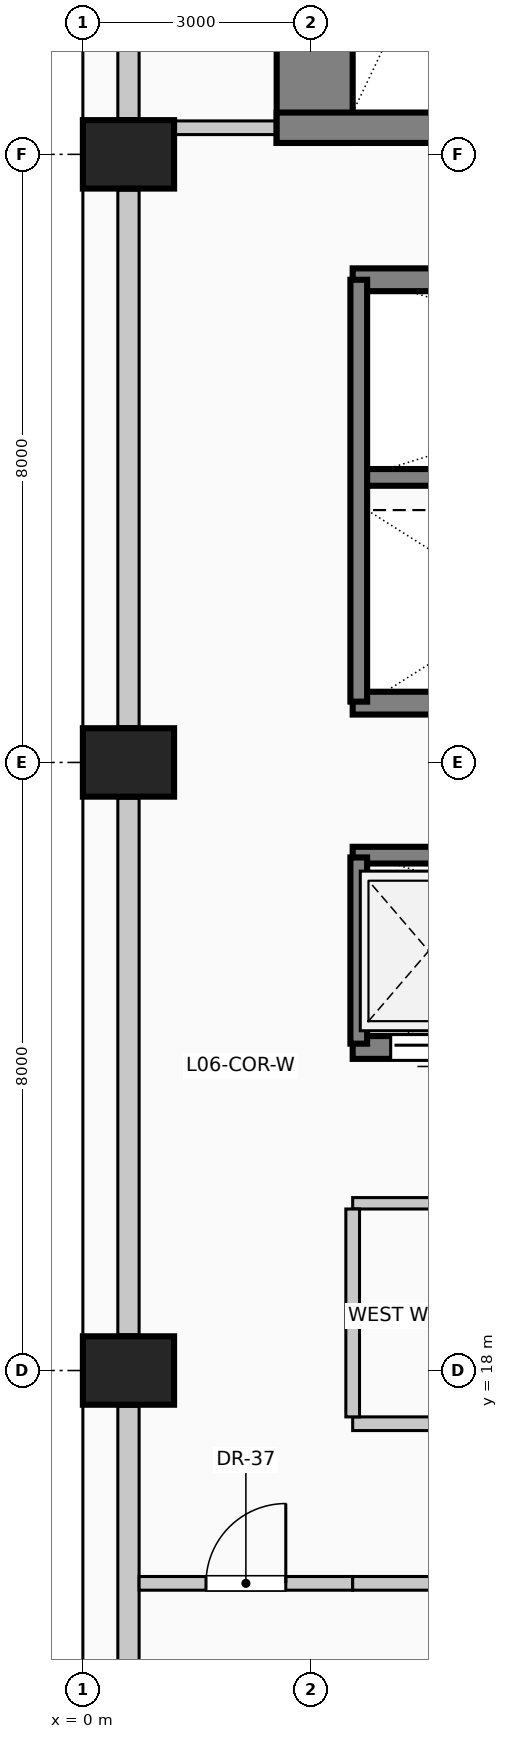
"""IFC4 building model, lengths in metres.
Left out: names, types, materials, properties, quantities, classifications, styles, units other than length and angle.
Written with IfcOpenShell. Run it as: python <this file> out.ifc"""

import sys

from ifc_helpers import new_model, si_unit, direction, frame, frame_2d, origin, origin_2d, place, context, subcontext, project, spatial, rectangle, extrude, element, fill, save


model = new_model("IFC4")
c1 = context("Model", 3, precision=1e-05, world=origin(), true_north=direction((0.0, 1.0)))
c2 = subcontext(c1, "Body", "Model", "MODEL_VIEW")
j1 = project(units=[si_unit("LENGTHUNIT", "METRE"), si_unit("PLANEANGLEUNIT", "RADIAN")], contexts=[c1])
p1 = place(None, origin())
s1 = spatial("IfcSite", under=j1, at=p1, CompositionType="ELEMENT")
p2 = place(p1, origin())
s2 = spatial("IfcBuilding", under=s1, at=p2, CompositionType="ELEMENT")
p3 = place(p2, frame((0.0, 0.0, 26.6)))
s3 = spatial("IfcBuildingStorey", under=s2, at=p3, CompositionType="ELEMENT", Elevation=26.6)
p4 = place(p3, frame((3.05, 34.15, 0.0), z_axis=(0.0, 0.0, 1.0), x_axis=(0.0, 1.0, 0.0)))
e1 = element("IfcWall", 1, at=p4, inside=s3, PredefinedType="SHEAR", context=c2, shape_type="SweptSolid", body=[
    extrude(rectangle(XDim=9.28, YDim=1.0, at=frame_2d((4.64, 0.0))), origin(), (0.0, 0.0, 1.0), 4.0),
])
p5 = place(p3, frame((2.55, 34.35, 0.0), z_axis=(0.0, 0.0, 1.0), x_axis=(1.0, 0.0, 0.0)))
e2 = element("IfcWall", 2, at=p5, inside=s3, PredefinedType="SHEAR", context=c2, shape_type="SweptSolid", body=[
    extrude(rectangle(XDim=5.16, YDim=0.4, at=frame_2d((2.58, 0.0))), origin(), (0.0, 0.0, 1.0), 4.0),
])
p6 = place(p5, frame((2.4, 0.0, 0.0)))
e3 = element("IfcOpeningElement", 3, at=p6, cuts=e2, PredefinedType="OPENING", context=c2, shape_type="SweptSolid", body=[
    extrude(rectangle(XDim=1.15, YDim=2.2, at=frame_2d((0.575, 1.1))), frame((0.0, 0.21, 0.0), z_axis=(0.0, -1.0, 0.0), x_axis=(1.0, 0.0, 0.0)), (0.0, 0.0, 1.0), 0.42),
])
for number, where, z_axis, x_axis in (
    (4, (0.6, 18.0, 0.0), (0.0, 0.0, 1.0), (0.0, 1.0, 0.0)),
    (5, (0.6, 26.0, 0.0), (0.0, 0.0, 1.0), (0.0, 1.0, 0.0)),
    (6, (0.6, 34.0, 0.0), (0.0, 0.0, 1.0), (0.0, 1.0, 0.0)),
):
    element("IfcColumn", number, at=place(p3, frame(where, z_axis=z_axis, x_axis=x_axis)), inside=s3, PredefinedType="COLUMN", context=c2, shape_type="SweptSolid", body=[
        extrude(rectangle(XDim=0.9, YDim=1.2, at=origin_2d()), origin(), (0.0, 0.0, 1.0), 4.0),
    ])
p7 = place(p3, frame((0.6, 10.47, 0.0), z_axis=(0.0, 0.0, 1.0), x_axis=(0.0, 1.0, 0.0)))
e7 = element("IfcWall", 7, at=p7, inside=s3, PredefinedType="SOLIDWALL", context=c2, shape_type="SweptSolid", body=[
    extrude(rectangle(XDim=7.06, YDim=0.28, at=frame_2d((3.53, 0.0))), origin(), (0.0, 0.0, 1.0), 2.85),
])
p8 = place(p7, frame((0.887, 0.0, 0.42)))
e8 = element("IfcOpeningElement", 8, at=p8, cuts=e7, PredefinedType="OPENING", context=c2, shape_type="SweptSolid", body=[
    extrude(rectangle(XDim=2.2, YDim=1.95, at=frame_2d((1.1, 0.975))), frame((0.0, 0.15, 0.0), z_axis=(0.0, -1.0, 0.0), x_axis=(1.0, 0.0, 0.0)), (0.0, 0.0, 1.0), 0.3),
])
for number, where, z_axis, x_axis in (
    (9, (0.6, 18.47, 0.0), (0.0, 0.0, 1.0), (0.0, 1.0, 0.0)),
    (10, (0.6, 26.47, 0.0), (0.0, 0.0, 1.0), (0.0, 1.0, 0.0)),
):
    element("IfcWall", number, at=place(p3, frame(where, z_axis=z_axis, x_axis=x_axis)), inside=s3, PredefinedType="SOLIDWALL", context=c2, shape_type="SweptSolid", body=[
        extrude(rectangle(XDim=7.06, YDim=0.28, at=frame_2d((3.53, 0.0))), origin(), (0.0, 0.0, 1.0), 2.85),
    ])
p9 = place(p3, frame((0.6, 34.47, 0.0), z_axis=(0.0, 0.0, 1.0), x_axis=(0.0, 1.0, 0.0)))
e11 = element("IfcWall", 11, at=p9, inside=s3, PredefinedType="SOLIDWALL", context=c2, shape_type="SweptSolid", body=[
    extrude(rectangle(XDim=7.46, YDim=0.28, at=frame_2d((3.73, 0.0))), origin(), (0.0, 0.0, 1.0), 2.85),
])
p10 = place(p3, frame((5.65, 22.25, 0.0), z_axis=(0.0, 0.0, 1.0), x_axis=(-1.0, 0.0, 0.0)))
e12 = element("IfcWall", 12, at=p10, inside=s3, PredefinedType="SOLIDWALL", context=c2, shape_type="SweptSolid", body=[
    extrude(rectangle(XDim=2.1, YDim=0.3, at=frame_2d((1.05, 0.0))), origin(), (0.0, 0.0, 1.0), 4.0),
])
p11 = place(p10, frame((0.5, 0.0, 0.0)))
e13 = element("IfcOpeningElement", 13, at=p11, cuts=e12, PredefinedType="OPENING", context=c2, shape_type="SweptSolid", body=[
    extrude(rectangle(XDim=1.1, YDim=2.2, at=frame_2d((0.55, 1.1))), frame((0.0, 0.16, 0.0), z_axis=(0.0, -1.0, 0.0), x_axis=(1.0, 0.0, 0.0)), (0.0, 0.0, 1.0), 0.32),
])
for number, where, z_axis, x_axis in (
    (14, (3.55, 32.35, 0.0), (0.0, 0.0, 1.0), (1.0, 0.0, 0.0)),
    (15, (5.65, 26.78, 0.0), (0.0, 0.0, 1.0), (-1.0, 0.0, 0.0)),
):
    element("IfcWall", number, at=place(p3, frame(where, z_axis=z_axis, x_axis=x_axis)), inside=s3, PredefinedType="SOLIDWALL", context=c2, shape_type="SweptSolid", body=[
        extrude(rectangle(XDim=2.1, YDim=0.3, at=frame_2d((1.05, 0.0))), origin(), (0.0, 0.0, 1.0), 4.0),
    ])
p12 = place(p3, frame((3.55, 29.75, 0.0), z_axis=(0.0, 0.0, 1.0), x_axis=(1.0, 0.0, 0.0)))
e16 = element("IfcWall", 16, at=p12, inside=s3, PredefinedType="SOLIDWALL", context=c2, shape_type="SweptSolid", body=[
    extrude(rectangle(XDim=8.65, YDim=0.22, at=frame_2d((4.325, 0.0))), origin(), (0.0, 0.0, 1.0), 4.0),
])
p13 = place(p3, frame((3.63, 26.8, 0.0), z_axis=(0.0, 0.0, 1.0), x_axis=(0.0, 1.0, 0.0)))
e17 = element("IfcWall", 17, at=p13, inside=s3, PredefinedType="SOLIDWALL", context=c2, shape_type="SweptSolid", body=[
    extrude(rectangle(XDim=5.55, YDim=0.22, at=frame_2d((2.775, 0.0))), origin(), (0.0, 0.0, 1.0), 4.0),
])
p14 = place(p3, frame((3.55, 24.78, 0.0), z_axis=(0.0, 0.0, 1.0), x_axis=(1.0, 0.0, 0.0)))
e18 = element("IfcWall", 18, at=p14, inside=s3, PredefinedType="SOLIDWALL", context=c2, shape_type="SweptSolid", body=[
    extrude(rectangle(XDim=8.65, YDim=0.22, at=frame_2d((4.325, 0.0))), origin(), (0.0, 0.0, 1.0), 4.0),
])
p15 = place(p3, frame((3.63, 22.3, 0.0), z_axis=(0.0, 0.0, 1.0), x_axis=(0.0, 1.0, 0.0)))
e19 = element("IfcWall", 19, at=p15, inside=s3, PredefinedType="SOLIDWALL", context=c2, shape_type="SweptSolid", body=[
    extrude(rectangle(XDim=2.45, YDim=0.22, at=frame_2d((1.225, 0.0))), origin(), (0.0, 0.0, 1.0), 4.0),
])
p16 = place(p3, frame((0.74, 15.2, 0.0), z_axis=(0.0, 0.0, 1.0), x_axis=(1.0, 0.0, 0.0)))
e20 = element("IfcWall", 20, at=p16, inside=s3, PredefinedType="PARTITIONING", context=c2, shape_type="SweptSolid", body=[
    extrude(rectangle(XDim=2.81, YDim=0.18, at=frame_2d((1.405, 0.0))), origin(), (0.0, 0.0, 1.0), 3.7),
])
p17 = place(p16, frame((0.88, 0.0, 0.0)))
e21 = element("IfcOpeningElement", 21, at=p17, cuts=e20, PredefinedType="OPENING", context=c2, shape_type="SweptSolid", body=[
    extrude(rectangle(XDim=1.05, YDim=2.15, at=frame_2d((0.525, 1.075))), frame((0.0, 0.1, 0.0), z_axis=(0.0, -1.0, 0.0), x_axis=(1.0, 0.0, 0.0)), (0.0, 0.0, 1.0), 0.2),
])
p18 = place(p3, frame((3.55, 15.2, 0.0), z_axis=(0.0, 0.0, 1.0), x_axis=(1.0, 0.0, 0.0)))
e22 = element("IfcWall", 22, at=p18, inside=s3, PredefinedType="PARTITIONING", context=c2, shape_type="SweptSolid", body=[
    extrude(rectangle(XDim=5.65, YDim=0.18, at=frame_2d((2.825, 0.0))), origin(), (0.0, 0.0, 1.0), 3.7),
])
p19 = place(p3, frame((3.55, 17.3, 0.0), z_axis=(0.0, 0.0, 1.0), x_axis=(1.0, 0.0, 0.0)))
e23 = element("IfcWall", 23, at=p19, inside=s3, PredefinedType="PARTITIONING", context=c2, shape_type="SweptSolid", body=[
    extrude(rectangle(XDim=8.65, YDim=0.18, at=frame_2d((4.325, 0.0))), origin(), (0.0, 0.0, 1.0), 3.7),
])
p20 = place(p19, frame((3.8, 0.0, 0.0)))
e24 = element("IfcOpeningElement", 24, at=p20, cuts=e23, PredefinedType="OPENING", context=c2, shape_type="SweptSolid", body=[
    extrude(rectangle(XDim=1.05, YDim=2.15, at=frame_2d((0.525, 1.075))), frame((0.0, 0.1, 0.0), z_axis=(0.0, -1.0, 0.0), x_axis=(1.0, 0.0, 0.0)), (0.0, 0.0, 1.0), 0.2),
])
p21 = place(p3, frame((3.55, 20.2, 0.0), z_axis=(0.0, 0.0, 1.0), x_axis=(1.0, 0.0, 0.0)))
e25 = element("IfcWall", 25, at=p21, inside=s3, PredefinedType="PARTITIONING", context=c2, shape_type="SweptSolid", body=[
    extrude(rectangle(XDim=8.65, YDim=0.15, at=frame_2d((4.325, 0.0))), origin(), (0.0, 0.0, 1.0), 3.7),
])
p22 = place(p3, frame((1.2, 34.35, 0.0), z_axis=(0.0, 0.0, 1.0), x_axis=(1.0, 0.0, 0.0)))
e26 = element("IfcWall", 26, at=p22, inside=s3, PredefinedType="PARTITIONING", context=c2, shape_type="SweptSolid", body=[
    extrude(rectangle(XDim=1.35, YDim=0.18, at=frame_2d((0.675, 0.0))), origin(), (0.0, 0.0, 1.0), 3.7),
])
p23 = place(p3, frame((3.55, 17.39, 0.0), z_axis=(0.0, 0.0, 1.0), x_axis=(0.0, 1.0, 0.0)))
e27 = element("IfcWall", 27, at=p23, inside=s3, PredefinedType="PARTITIONING", context=c2, shape_type="SweptSolid", body=[
    extrude(rectangle(XDim=2.735, YDim=0.18, at=frame_2d((1.368, 0.0))), origin(), (0.0, 0.0, 1.0), 3.7),
])
p24 = place(p11, origin())
e28 = element("IfcDoor", 28, at=p24, inside=s3, OperationType="SLIDING_TO_LEFT", PredefinedType="DOOR", context=c2, shape_type="SweptSolid", body=[
    extrude(rectangle(XDim=1.1, YDim=2.2, at=frame_2d((0.55, 1.1))), frame((0.0, 0.025, 0.0), z_axis=(0.0, -1.0, 0.0), x_axis=(1.0, 0.0, 0.0)), (0.0, 0.0, 1.0), 0.05),
])
fill(e13, e28)
p25 = place(p17, origin())
e29 = element("IfcDoor", 29, at=p25, inside=s3, OperationType="SINGLE_SWING_RIGHT", PredefinedType="DOOR", context=c2, shape_type="SweptSolid", body=[
    extrude(rectangle(XDim=1.05, YDim=2.15, at=frame_2d((0.525, 1.075))), frame((0.0, 0.025, 0.0), z_axis=(0.0, -1.0, 0.0), x_axis=(1.0, 0.0, 0.0)), (0.0, 0.0, 1.0), 0.05),
])
fill(e21, e29)
save(model, sys.argv[1])
